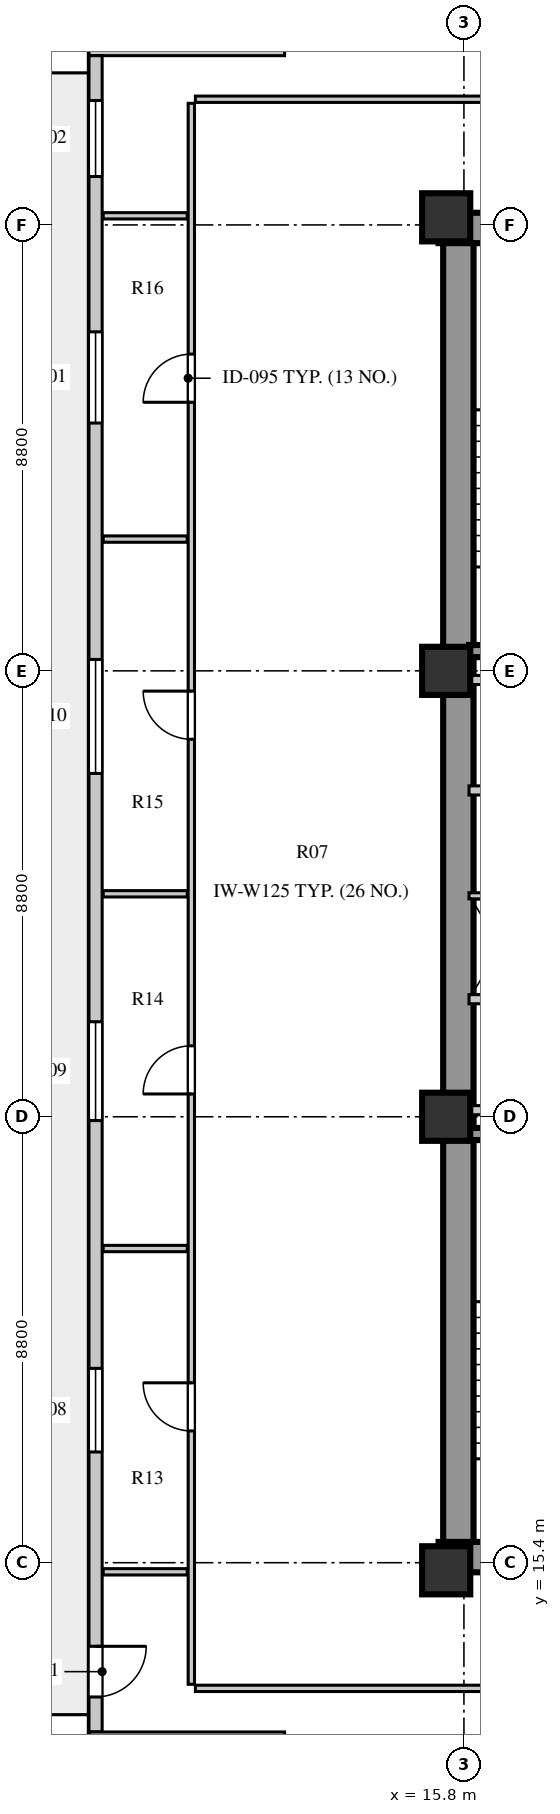
"""IFC4 building model, lengths in metres.
Left out: names, types, materials, properties, quantities, classifications, styles, units other than length and angle.
Written with IfcOpenShell. Run it as: python <this file> out.ifc"""

import sys

from ifc_helpers import new_model, si_unit, direction, frame, frame_2d, origin, origin_2d, place, context, subcontext, project, spatial, rectangle, extrude, element, fill, save


model = new_model("IFC4")
c1 = context("Model", 3, precision=1e-05, world=origin(), true_north=direction((0.0, 1.0)))
c2 = subcontext(c1, "Body", "Model", "MODEL_VIEW")
j1 = project(units=[si_unit("LENGTHUNIT", "METRE"), si_unit("PLANEANGLEUNIT", "RADIAN")], contexts=[c1])
p1 = place(None, origin())
s1 = spatial("IfcSite", under=j1, at=p1, CompositionType="ELEMENT")
p2 = place(p1, origin())
s2 = spatial("IfcBuilding", under=s1, at=p2, CompositionType="ELEMENT")
p3 = place(p2, frame((0.0, 0.0, 90.0)))
s3 = spatial("IfcBuildingStorey", under=s2, at=p3, CompositionType="ELEMENT", Elevation=90.0)
for number, where, z_axis, x_axis in (
    (1, (15.3, 15.51, 0.0), (0.0, 0.0, 1.0), (1.0, 0.0, 0.0)),
    (2, (15.3, 41.74, 0.0), (0.0, 0.0, 1.0), (1.0, 0.0, 0.0)),
):
    element("IfcWall", number, at=place(p3, frame(where, z_axis=z_axis, x_axis=x_axis)), inside=s3, PredefinedType="SHEAR", context=c2, shape_type="SweptSolid", body=[
        extrude(rectangle(XDim=9.88, YDim=0.6, at=frame_2d((4.94, 0.0))), origin(), (0.0, 0.0, 1.0), 3.7),
    ])
p4 = place(p3, frame((15.69, 15.81, 0.0), z_axis=(0.0, 0.0, 1.0), x_axis=(0.0, 1.0, 0.0)))
e3 = element("IfcWall", 3, at=p4, inside=s3, PredefinedType="SHEAR", context=c2, shape_type="SweptSolid", body=[
    extrude(rectangle(XDim=25.63, YDim=0.6, at=frame_2d((12.815, 0.0))), origin(), (0.0, 0.0, 1.0), 3.7),
])
for number, where, z_axis, x_axis in (
    (4, (15.45, 15.25, 0.0), (0.0, 0.0, 1.0), (1.0, 0.0, 0.0)),
    (5, (15.45, 24.2, 0.0), (0.0, 0.0, 1.0), (1.0, 0.0, 0.0)),
    (6, (15.45, 33.0, 0.0), (0.0, 0.0, 1.0), (1.0, 0.0, 0.0)),
    (7, (15.45, 41.95, 0.0), (0.0, 0.0, 1.0), (1.0, 0.0, 0.0)),
):
    element("IfcColumn", number, at=place(p3, frame(where, z_axis=z_axis, x_axis=x_axis)), inside=s3, PredefinedType="COLUMN", context=c2, shape_type="SweptSolid", body=[
        extrude(rectangle(XDim=0.95, YDim=0.95, at=origin_2d()), origin(), (0.0, 0.0, 1.0), 3.7),
    ])
p5 = place(p3, frame((12.26, 45.27, 0.0), z_axis=(0.0, 0.0, 1.0), x_axis=(-1.0, 0.0, 0.0)))
e8 = element("IfcWall", 8, at=p5, inside=s3, PredefinedType="SOLIDWALL", context=c2, shape_type="SweptSolid", body=[
    extrude(rectangle(XDim=3.86, YDim=0.26, at=frame_2d((1.93, 0.0))), origin(), (0.0, 0.0, 1.0), 3.7),
])
p6 = place(p3, frame((8.53, 45.14, 0.0), z_axis=(0.0, 0.0, 1.0), x_axis=(0.0, -1.0, 0.0)))
e9 = element("IfcWall", 9, at=p6, inside=s3, PredefinedType="SOLIDWALL", context=c2, shape_type="SweptSolid", body=[
    extrude(rectangle(XDim=33.08, YDim=0.26, at=frame_2d((16.54, 0.0))), origin(), (0.0, 0.0, 1.0), 3.7),
])
p7 = place(p6, frame((31.39, 0.0, 0.0)))
e10 = element("IfcOpeningElement", 10, at=p7, cuts=e9, PredefinedType="OPENING", context=c2, shape_type="SweptSolid", body=[
    extrude(rectangle(XDim=1.0, YDim=2.05, at=frame_2d((0.5, 1.025))), frame((0.0, 0.14, 0.0), z_axis=(0.0, -1.0, 0.0), x_axis=(1.0, 0.0, 0.0)), (0.0, 0.0, 1.0), 0.28),
])
p8 = place(p6, frame((25.905, 0.0, 0.8)))
e11 = element("IfcOpeningElement", 11, at=p8, cuts=e9, PredefinedType="OPENING", context=c2, shape_type="SweptSolid", body=[
    extrude(rectangle(XDim=1.65, YDim=1.95, at=frame_2d((0.825, 0.975))), frame((0.0, 0.14, 0.0), z_axis=(0.0, -1.0, 0.0), x_axis=(1.0, 0.0, 0.0)), (0.0, 0.0, 1.0), 0.28),
])
p9 = place(p6, frame((19.065, 0.0, 0.8)))
e12 = element("IfcOpeningElement", 12, at=p9, cuts=e9, PredefinedType="OPENING", context=c2, shape_type="SweptSolid", body=[
    extrude(rectangle(XDim=1.95, YDim=2.0, at=frame_2d((0.975, 1.0))), frame((0.0, 0.14, 0.0), z_axis=(0.0, -1.0, 0.0), x_axis=(1.0, 0.0, 0.0)), (0.0, 0.0, 1.0), 0.28),
])
p10 = place(p6, frame((11.915, 0.0, 0.8)))
e13 = element("IfcOpeningElement", 13, at=p10, cuts=e9, PredefinedType="OPENING", context=c2, shape_type="SweptSolid", body=[
    extrude(rectangle(XDim=2.25, YDim=2.0, at=frame_2d((1.125, 1.0))), frame((0.0, 0.14, 0.0), z_axis=(0.0, -1.0, 0.0), x_axis=(1.0, 0.0, 0.0)), (0.0, 0.0, 1.0), 0.28),
])
p11 = place(p6, frame((5.45, 0.0, 0.8)))
e14 = element("IfcOpeningElement", 14, at=p11, cuts=e9, PredefinedType="OPENING", context=c2, shape_type="SweptSolid", body=[
    extrude(rectangle(XDim=1.8, YDim=2.0, at=frame_2d((0.9, 1.0))), frame((0.0, 0.14, 0.0), z_axis=(0.0, -1.0, 0.0), x_axis=(1.0, 0.0, 0.0)), (0.0, 0.0, 1.0), 0.28),
])
p12 = place(p6, frame((0.885, 0.0, 0.8)))
e15 = element("IfcOpeningElement", 15, at=p12, cuts=e9, PredefinedType="OPENING", context=c2, shape_type="SweptSolid", body=[
    extrude(rectangle(XDim=1.5, YDim=2.0, at=frame_2d((0.75, 1.0))), frame((0.0, 0.14, 0.0), z_axis=(0.0, -1.0, 0.0), x_axis=(1.0, 0.0, 0.0)), (0.0, 0.0, 1.0), 0.28),
])
p13 = place(p3, frame((8.4, 11.93, 0.0), z_axis=(0.0, 0.0, 1.0), x_axis=(1.0, 0.0, 0.0)))
e16 = element("IfcWall", 16, at=p13, inside=s3, PredefinedType="SOLIDWALL", context=c2, shape_type="SweptSolid", body=[
    extrude(rectangle(XDim=3.86, YDim=0.26, at=frame_2d((1.93, 0.0))), origin(), (0.0, 0.0, 1.0), 3.7),
])
p14 = place(p3, frame((15.9, 23.86, 0.0), z_axis=(0.0, 0.0, 1.0), x_axis=(1.0, 0.0, 0.0)))
e17 = element("IfcWall", 17, at=p14, inside=s3, PredefinedType="SHEAR", context=c2, shape_type="SweptSolid", body=[
    extrude(rectangle(XDim=3.52, YDim=0.24, at=frame_2d((1.76, 0.0))), origin(), (0.0, 0.0, 1.0), 4.0),
])
p15 = place(p3, frame((15.9, 26.52, 0.0), z_axis=(0.0, 0.0, 1.0), x_axis=(1.0, 0.0, 0.0)))
e18 = element("IfcWall", 18, at=p15, inside=s3, PredefinedType="SOLIDWALL", context=c2, shape_type="SweptSolid", body=[
    extrude(rectangle(XDim=8.68, YDim=0.18, at=frame_2d((4.34, 0.0))), origin(), (0.0, 0.0, 1.0), 3.7),
])
p16 = place(p15, frame((1.76, 0.0, 0.0)))
e19 = element("IfcOpeningElement", 19, at=p16, cuts=e18, PredefinedType="OPENING", context=c2, shape_type="SweptSolid", body=[
    extrude(rectangle(XDim=1.0, YDim=2.1, at=frame_2d((0.5, 1.05))), frame((0.0, 0.1, 0.0), z_axis=(0.0, -1.0, 0.0), x_axis=(1.0, 0.0, 0.0)), (0.0, 0.0, 1.0), 0.2),
])
p17 = place(p15, frame((3.6, 0.0, 0.0)))
e20 = element("IfcOpeningElement", 20, at=p17, cuts=e18, PredefinedType="OPENING", context=c2, shape_type="SweptSolid", body=[
    extrude(rectangle(XDim=1.0, YDim=2.1, at=frame_2d((0.5, 1.05))), frame((0.0, 0.1, 0.0), z_axis=(0.0, -1.0, 0.0), x_axis=(1.0, 0.0, 0.0)), (0.0, 0.0, 1.0), 0.2),
])
p18 = place(p15, frame((5.44, 0.0, 0.0)))
e21 = element("IfcOpeningElement", 21, at=p18, cuts=e18, PredefinedType="OPENING", context=c2, shape_type="SweptSolid", body=[
    extrude(rectangle(XDim=1.0, YDim=2.1, at=frame_2d((0.5, 1.05))), frame((0.0, 0.1, 0.0), z_axis=(0.0, -1.0, 0.0), x_axis=(1.0, 0.0, 0.0)), (0.0, 0.0, 1.0), 0.2),
])
p19 = place(p15, frame((7.28, 0.0, 0.0)))
e22 = element("IfcOpeningElement", 22, at=p19, cuts=e18, PredefinedType="OPENING", context=c2, shape_type="SweptSolid", body=[
    extrude(rectangle(XDim=1.0, YDim=2.1, at=frame_2d((0.5, 1.05))), frame((0.0, 0.1, 0.0), z_axis=(0.0, -1.0, 0.0), x_axis=(1.0, 0.0, 0.0)), (0.0, 0.0, 1.0), 0.2),
])
p20 = place(p3, frame((15.9, 24.33, 0.0), z_axis=(0.0, 0.0, 1.0), x_axis=(1.0, 0.0, 0.0)))
e23 = element("IfcWall", 23, at=p20, inside=s3, PredefinedType="SOLIDWALL", context=c2, shape_type="SweptSolid", body=[
    extrude(rectangle(XDim=8.68, YDim=0.18, at=frame_2d((4.34, 0.0))), origin(), (0.0, 0.0, 1.0), 3.0),
])
p21 = place(p3, frame((15.9, 28.56, 0.0), z_axis=(0.0, 0.0, 1.0), x_axis=(1.0, 0.0, 0.0)))
e24 = element("IfcWall", 24, at=p21, inside=s3, PredefinedType="PARTITIONING", context=c2, shape_type="SweptSolid", body=[
    extrude(rectangle(XDim=1.2, YDim=0.12, at=frame_2d((0.6, 0.0))), origin(), (0.0, 0.0, 1.0), 3.7),
])
p22 = place(p3, frame((15.9, 30.64, 0.0), z_axis=(0.0, 0.0, 1.0), x_axis=(1.0, 0.0, 0.0)))
e25 = element("IfcWall", 25, at=p22, inside=s3, PredefinedType="SOLIDWALL", context=c2, shape_type="SweptSolid", body=[
    extrude(rectangle(XDim=8.68, YDim=0.18, at=frame_2d((4.34, 0.0))), origin(), (0.0, 0.0, 1.0), 3.7),
])
p23 = place(p22, frame((1.76, 0.0, 0.0)))
e26 = element("IfcOpeningElement", 26, at=p23, cuts=e25, PredefinedType="OPENING", context=c2, shape_type="SweptSolid", body=[
    extrude(rectangle(XDim=1.0, YDim=2.1, at=frame_2d((0.5, 1.05))), frame((0.0, 0.1, 0.0), z_axis=(0.0, -1.0, 0.0), x_axis=(1.0, 0.0, 0.0)), (0.0, 0.0, 1.0), 0.2),
])
p24 = place(p22, frame((3.6, 0.0, 0.0)))
e27 = element("IfcOpeningElement", 27, at=p24, cuts=e25, PredefinedType="OPENING", context=c2, shape_type="SweptSolid", body=[
    extrude(rectangle(XDim=1.0, YDim=2.1, at=frame_2d((0.5, 1.05))), frame((0.0, 0.1, 0.0), z_axis=(0.0, -1.0, 0.0), x_axis=(1.0, 0.0, 0.0)), (0.0, 0.0, 1.0), 0.2),
])
p25 = place(p22, frame((5.44, 0.0, 0.0)))
e28 = element("IfcOpeningElement", 28, at=p25, cuts=e25, PredefinedType="OPENING", context=c2, shape_type="SweptSolid", body=[
    extrude(rectangle(XDim=1.0, YDim=2.1, at=frame_2d((0.5, 1.05))), frame((0.0, 0.1, 0.0), z_axis=(0.0, -1.0, 0.0), x_axis=(1.0, 0.0, 0.0)), (0.0, 0.0, 1.0), 0.2),
])
p26 = place(p22, frame((7.28, 0.0, 0.0)))
e29 = element("IfcOpeningElement", 29, at=p26, cuts=e25, PredefinedType="OPENING", context=c2, shape_type="SweptSolid", body=[
    extrude(rectangle(XDim=1.0, YDim=2.1, at=frame_2d((0.5, 1.05))), frame((0.0, 0.1, 0.0), z_axis=(0.0, -1.0, 0.0), x_axis=(1.0, 0.0, 0.0)), (0.0, 0.0, 1.0), 0.2),
])
p27 = place(p3, frame((15.9, 32.82, 0.0), z_axis=(0.0, 0.0, 1.0), x_axis=(1.0, 0.0, 0.0)))
e30 = element("IfcWall", 30, at=p27, inside=s3, PredefinedType="SOLIDWALL", context=c2, shape_type="SweptSolid", body=[
    extrude(rectangle(XDim=8.68, YDim=0.18, at=frame_2d((4.34, 0.0))), origin(), (0.0, 0.0, 1.0), 3.0),
])
p28 = place(p3, frame((15.9, 33.39, 0.0), z_axis=(0.0, 0.0, 1.0), x_axis=(1.0, 0.0, 0.0)))
e31 = element("IfcWall", 31, at=p28, inside=s3, PredefinedType="SHEAR", context=c2, shape_type="SweptSolid", body=[
    extrude(rectangle(XDim=3.52, YDim=0.24, at=frame_2d((1.76, 0.0))), origin(), (0.0, 0.0, 1.0), 4.0),
])
p29 = place(p3, frame((10.42, 13.0, 0.0), z_axis=(0.0, 0.0, 1.0), x_axis=(0.0, 1.0, 0.0)))
e32 = element("IfcWall", 32, at=p29, inside=s3, PredefinedType="PLUMBINGWALL", context=c2, shape_type="SweptSolid", body=[
    extrude(rectangle(XDim=31.2, YDim=0.125, at=frame_2d((15.6, 0.0))), origin(), (0.0, 0.0, 1.0), 3.7),
])
p30 = place(p29, frame((5.0, 0.0, 0.0)))
e33 = element("IfcOpeningElement", 33, at=p30, cuts=e32, PredefinedType="OPENING", context=c2, shape_type="SweptSolid", body=[
    extrude(rectangle(XDim=0.95, YDim=2.08, at=frame_2d((0.475, 1.04))), frame((0.0, 0.073, 0.0), z_axis=(0.0, -1.0, 0.0), x_axis=(1.0, 0.0, 0.0)), (0.0, 0.0, 1.0), 0.145),
])
p31 = place(p29, frame((11.65, 0.0, 0.0)))
e34 = element("IfcOpeningElement", 34, at=p31, cuts=e32, PredefinedType="OPENING", context=c2, shape_type="SweptSolid", body=[
    extrude(rectangle(XDim=0.95, YDim=2.08, at=frame_2d((0.475, 1.04))), frame((0.0, 0.073, 0.0), z_axis=(0.0, -1.0, 0.0), x_axis=(1.0, 0.0, 0.0)), (0.0, 0.0, 1.0), 0.145),
])
p32 = place(p29, frame((18.65, 0.0, 0.0)))
e35 = element("IfcOpeningElement", 35, at=p32, cuts=e32, PredefinedType="OPENING", context=c2, shape_type="SweptSolid", body=[
    extrude(rectangle(XDim=0.95, YDim=2.08, at=frame_2d((0.475, 1.04))), frame((0.0, 0.073, 0.0), z_axis=(0.0, -1.0, 0.0), x_axis=(1.0, 0.0, 0.0)), (0.0, 0.0, 1.0), 0.145),
])
p33 = place(p29, frame((25.3, 0.0, 0.0)))
e36 = element("IfcOpeningElement", 36, at=p33, cuts=e32, PredefinedType="OPENING", context=c2, shape_type="SweptSolid", body=[
    extrude(rectangle(XDim=0.95, YDim=2.08, at=frame_2d((0.475, 1.04))), frame((0.0, 0.073, 0.0), z_axis=(0.0, -1.0, 0.0), x_axis=(1.0, 0.0, 0.0)), (0.0, 0.0, 1.0), 0.145),
])
for number, where, z_axis, x_axis in (
    (37, (8.68, 15.22, 0.0), (0.0, 0.0, 1.0), (1.0, 0.0, 0.0)),
    (38, (8.68, 41.98, 0.0), (0.0, 0.0, 1.0), (1.0, 0.0, 0.0)),
):
    element("IfcWall", number, at=place(p3, frame(where, z_axis=z_axis, x_axis=x_axis)), inside=s3, PredefinedType="PLUMBINGWALL", context=c2, shape_type="SweptSolid", body=[
        extrude(rectangle(XDim=1.66, YDim=0.125, at=frame_2d((0.83, 0.0))), origin(), (0.0, 0.0, 1.0), 3.2),
    ])
p34 = place(p3, frame((10.5, 12.92, 0.0), z_axis=(0.0, 0.0, 1.0), x_axis=(1.0, 0.0, 0.0)))
e39 = element("IfcWall", 39, at=p34, inside=s3, PredefinedType="PLUMBINGWALL", context=c2, shape_type="SweptSolid", body=[
    extrude(rectangle(XDim=14.7, YDim=0.125, at=frame_2d((7.35, 0.0))), origin(), (0.0, 0.0, 1.0), 3.7),
])
p35 = place(p34, frame((6.2, 0.0, 0.0)))
e40 = element("IfcOpeningElement", 40, at=p35, cuts=e39, PredefinedType="OPENING", context=c2, shape_type="SweptSolid", body=[
    extrude(rectangle(XDim=1.0, YDim=2.08, at=frame_2d((0.5, 1.04))), frame((0.0, 0.073, 0.0), z_axis=(0.0, -1.0, 0.0), x_axis=(1.0, 0.0, 0.0)), (0.0, 0.0, 1.0), 0.145),
])
p36 = place(p3, frame((10.5, 44.28, 0.0), z_axis=(0.0, 0.0, 1.0), x_axis=(1.0, 0.0, 0.0)))
e41 = element("IfcWall", 41, at=p36, inside=s3, PredefinedType="PLUMBINGWALL", context=c2, shape_type="SweptSolid", body=[
    extrude(rectangle(XDim=14.7, YDim=0.125, at=frame_2d((7.35, 0.0))), origin(), (0.0, 0.0, 1.0), 3.7),
])
p37 = place(p36, frame((6.2, 0.0, 0.0)))
e42 = element("IfcOpeningElement", 42, at=p37, cuts=e41, PredefinedType="OPENING", context=c2, shape_type="SweptSolid", body=[
    extrude(rectangle(XDim=1.0, YDim=2.08, at=frame_2d((0.5, 1.04))), frame((0.0, 0.073, 0.0), z_axis=(0.0, -1.0, 0.0), x_axis=(1.0, 0.0, 0.0)), (0.0, 0.0, 1.0), 0.145),
])
for number, where, z_axis, x_axis in (
    (43, (8.68, 21.6, 0.0), (0.0, 0.0, 1.0), (1.0, 0.0, 0.0)),
    (44, (8.68, 28.6, 0.0), (0.0, 0.0, 1.0), (1.0, 0.0, 0.0)),
    (45, (8.68, 35.6, 0.0), (0.0, 0.0, 1.0), (1.0, 0.0, 0.0)),
):
    element("IfcWall", number, at=place(p3, frame(where, z_axis=z_axis, x_axis=x_axis)), inside=s3, PredefinedType="PLUMBINGWALL", context=c2, shape_type="SweptSolid", body=[
        extrude(rectangle(XDim=1.66, YDim=0.125, at=frame_2d((0.83, 0.0))), origin(), (0.0, 0.0, 1.0), 3.7),
    ])
p38 = place(p7, frame((1.0, 0.0, 0.0), z_axis=(0.0, 0.0, 1.0), x_axis=(-1.0, 0.0, 0.0)))
e46 = element("IfcDoor", 46, at=p38, inside=s3, OperationType="SINGLE_SWING_RIGHT", PredefinedType="DOOR", context=c2, shape_type="SweptSolid", body=[
    extrude(rectangle(XDim=1.0, YDim=2.05, at=frame_2d((0.5, 1.025))), frame((0.0, 0.025, 0.0), z_axis=(0.0, -1.0, 0.0), x_axis=(1.0, 0.0, 0.0)), (0.0, 0.0, 1.0), 0.05),
])
fill(e10, e46)
p39 = place(p8, origin())
e47 = element("IfcWindow", 47, at=p39, inside=s3, PartitioningType="SINGLE_PANEL", PredefinedType="WINDOW", context=c2, shape_type="SweptSolid", body=[
    extrude(rectangle(XDim=1.65, YDim=1.95, at=frame_2d((0.825, 0.975))), frame((0.0, 0.03, 0.0), z_axis=(0.0, -1.0, 0.0), x_axis=(1.0, 0.0, 0.0)), (0.0, 0.0, 1.0), 0.06),
])
fill(e11, e47)
p40 = place(p9, origin())
e48 = element("IfcWindow", 48, at=p40, inside=s3, PartitioningType="SINGLE_PANEL", PredefinedType="WINDOW", context=c2, shape_type="SweptSolid", body=[
    extrude(rectangle(XDim=1.95, YDim=2.0, at=frame_2d((0.975, 1.0))), frame((0.0, 0.03, 0.0), z_axis=(0.0, -1.0, 0.0), x_axis=(1.0, 0.0, 0.0)), (0.0, 0.0, 1.0), 0.06),
])
fill(e12, e48)
p41 = place(p10, origin())
e49 = element("IfcWindow", 49, at=p41, inside=s3, PartitioningType="SINGLE_PANEL", PredefinedType="WINDOW", context=c2, shape_type="SweptSolid", body=[
    extrude(rectangle(XDim=2.25, YDim=2.0, at=frame_2d((1.125, 1.0))), frame((0.0, 0.03, 0.0), z_axis=(0.0, -1.0, 0.0), x_axis=(1.0, 0.0, 0.0)), (0.0, 0.0, 1.0), 0.06),
])
fill(e13, e49)
p42 = place(p11, origin())
e50 = element("IfcWindow", 50, at=p42, inside=s3, PartitioningType="SINGLE_PANEL", PredefinedType="WINDOW", context=c2, shape_type="SweptSolid", body=[
    extrude(rectangle(XDim=1.8, YDim=2.0, at=frame_2d((0.9, 1.0))), frame((0.0, 0.03, 0.0), z_axis=(0.0, -1.0, 0.0), x_axis=(1.0, 0.0, 0.0)), (0.0, 0.0, 1.0), 0.06),
])
fill(e14, e50)
p43 = place(p12, origin())
e51 = element("IfcWindow", 51, at=p43, inside=s3, PartitioningType="SINGLE_PANEL", PredefinedType="WINDOW", context=c2, shape_type="SweptSolid", body=[
    extrude(rectangle(XDim=1.5, YDim=2.0, at=frame_2d((0.75, 1.0))), frame((0.0, 0.03, 0.0), z_axis=(0.0, -1.0, 0.0), x_axis=(1.0, 0.0, 0.0)), (0.0, 0.0, 1.0), 0.06),
])
fill(e15, e51)
p44 = place(p30, frame((0.95, 0.0, 0.0), z_axis=(0.0, 0.0, 1.0), x_axis=(-1.0, 0.0, 0.0)))
e52 = element("IfcDoor", 52, at=p44, inside=s3, OperationType="SINGLE_SWING_LEFT", PredefinedType="DOOR", context=c2, shape_type="SweptSolid", body=[
    extrude(rectangle(XDim=0.95, YDim=2.08, at=frame_2d((0.475, 1.04))), frame((0.0, 0.025, 0.0), z_axis=(0.0, -1.0, 0.0), x_axis=(1.0, 0.0, 0.0)), (0.0, 0.0, 1.0), 0.05),
])
fill(e33, e52)
p45 = place(p31, frame((0.95, 0.0, 0.0), z_axis=(0.0, 0.0, 1.0), x_axis=(-1.0, 0.0, 0.0)))
e53 = element("IfcDoor", 53, at=p45, inside=s3, OperationType="SINGLE_SWING_RIGHT", PredefinedType="DOOR", context=c2, shape_type="SweptSolid", body=[
    extrude(rectangle(XDim=0.95, YDim=2.08, at=frame_2d((0.475, 1.04))), frame((0.0, 0.025, 0.0), z_axis=(0.0, -1.0, 0.0), x_axis=(1.0, 0.0, 0.0)), (0.0, 0.0, 1.0), 0.05),
])
fill(e34, e53)
p46 = place(p32, frame((0.95, 0.0, 0.0), z_axis=(0.0, 0.0, 1.0), x_axis=(-1.0, 0.0, 0.0)))
e54 = element("IfcDoor", 54, at=p46, inside=s3, OperationType="SINGLE_SWING_LEFT", PredefinedType="DOOR", context=c2, shape_type="SweptSolid", body=[
    extrude(rectangle(XDim=0.95, YDim=2.08, at=frame_2d((0.475, 1.04))), frame((0.0, 0.025, 0.0), z_axis=(0.0, -1.0, 0.0), x_axis=(1.0, 0.0, 0.0)), (0.0, 0.0, 1.0), 0.05),
])
fill(e35, e54)
p47 = place(p33, frame((0.95, 0.0, 0.0), z_axis=(0.0, 0.0, 1.0), x_axis=(-1.0, 0.0, 0.0)))
e55 = element("IfcDoor", 55, at=p47, inside=s3, OperationType="SINGLE_SWING_RIGHT", PredefinedType="DOOR", context=c2, shape_type="SweptSolid", body=[
    extrude(rectangle(XDim=0.95, YDim=2.08, at=frame_2d((0.475, 1.04))), frame((0.0, 0.025, 0.0), z_axis=(0.0, -1.0, 0.0), x_axis=(1.0, 0.0, 0.0)), (0.0, 0.0, 1.0), 0.05),
])
fill(e36, e55)
save(model, sys.argv[1])
